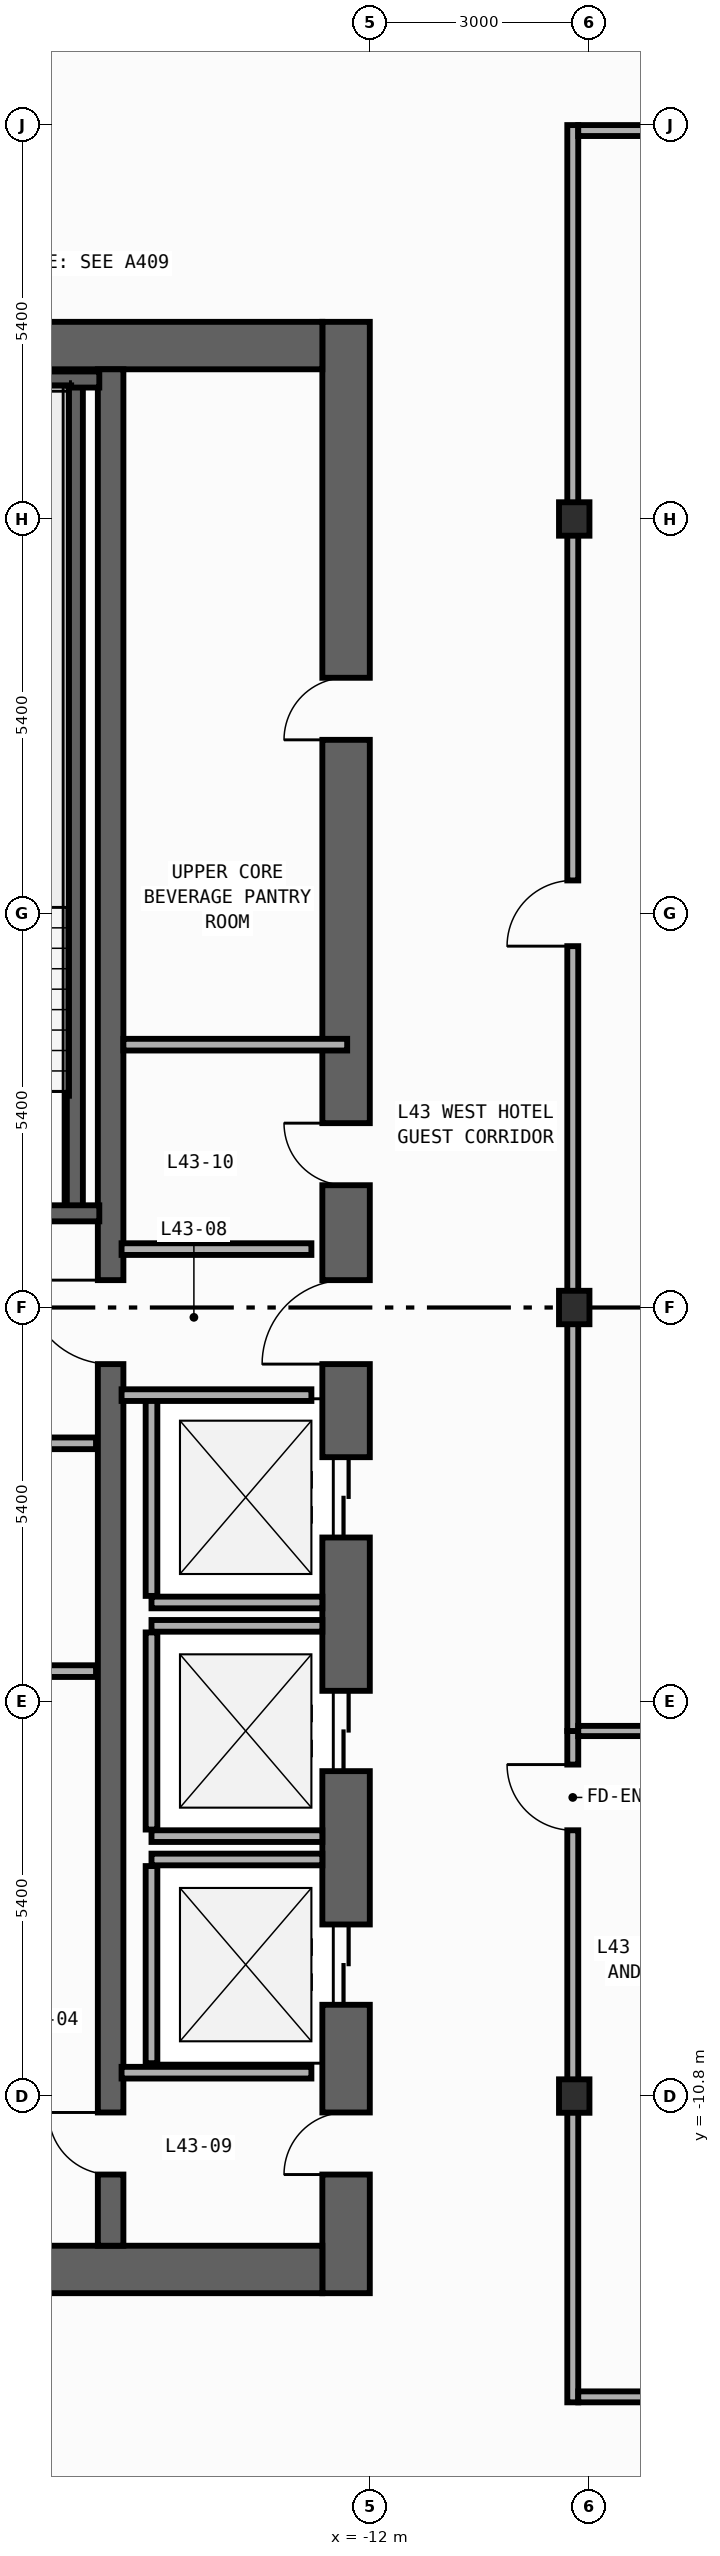
"""IFC4 building model, lengths in metres.
Left out: names, types, materials, properties, quantities, classifications, styles, units other than length and angle.
Written with IfcOpenShell. Run it as: python <this file> out.ifc"""

import sys

from ifc_helpers import new_model, si_unit, direction, frame, frame_2d, origin, origin_2d, place, context, subcontext, project, spatial, rectangle, i_section, extrude, element, fill, save


model = new_model("IFC4")
c1 = context("Model", 3, precision=1e-05, world=origin(), true_north=direction((0.0, 1.0)))
c2 = subcontext(c1, "Body", "Model", "MODEL_VIEW")
j1 = project(units=[si_unit("LENGTHUNIT", "METRE"), si_unit("PLANEANGLEUNIT", "RADIAN")], contexts=[c1])
p1 = place(None, origin())
s1 = spatial("IfcSite", under=j1, at=p1, CompositionType="ELEMENT")
p2 = place(p1, origin())
s2 = spatial("IfcBuilding", under=s1, at=p2, CompositionType="ELEMENT")
p3 = place(p2, frame((0.0, 0.0, 187.8)))
s3 = spatial("IfcBuildingStorey", under=s2, at=p3, CompositionType="ELEMENT", Elevation=187.8)
p4 = place(p3, frame((-12.325, -13.5, 0.0), z_axis=(0.0, 0.0, 1.0), x_axis=(0.0, 1.0, 0.0)))
e1 = element("IfcWall", 1, at=p4, inside=s3, PredefinedType="SHEAR", context=c2, shape_type="SweptSolid", body=[
    extrude(rectangle(XDim=27.0, YDim=0.65, at=frame_2d((13.5, 0.0))), origin(), (0.0, 0.0, 1.0), 3.54),
])
p5 = place(p4, frame((10.35, 0.0, 0.0)))
e2 = element("IfcOpeningElement", 2, at=p5, cuts=e1, PredefinedType="OPENING", context=c2, shape_type="SweptSolid", body=[
    extrude(rectangle(XDim=1.1, YDim=2.2, at=frame_2d((0.55, 1.1))), frame((0.0, 0.335, 0.0), z_axis=(0.0, -1.0, 0.0), x_axis=(1.0, 0.0, 0.0)), (0.0, 0.0, 1.0), 0.67),
])
p6 = place(p4, frame((7.15, 0.0, 0.0)))
e3 = element("IfcOpeningElement", 3, at=p6, cuts=e1, PredefinedType="OPENING", context=c2, shape_type="SweptSolid", body=[
    extrude(rectangle(XDim=1.1, YDim=2.2, at=frame_2d((0.55, 1.1))), frame((0.0, 0.335, 0.0), z_axis=(0.0, -1.0, 0.0), x_axis=(1.0, 0.0, 0.0)), (0.0, 0.0, 1.0), 0.67),
])
p7 = place(p4, frame((3.95, 0.0, 0.0)))
e4 = element("IfcOpeningElement", 4, at=p7, cuts=e1, PredefinedType="OPENING", context=c2, shape_type="SweptSolid", body=[
    extrude(rectangle(XDim=1.1, YDim=2.2, at=frame_2d((0.55, 1.1))), frame((0.0, 0.335, 0.0), z_axis=(0.0, -1.0, 0.0), x_axis=(1.0, 0.0, 0.0)), (0.0, 0.0, 1.0), 0.67),
])
p8 = place(p4, frame((15.175, 0.0, 0.0)))
e5 = element("IfcOpeningElement", 5, at=p8, cuts=e1, PredefinedType="OPENING", context=c2, shape_type="SweptSolid", body=[
    extrude(rectangle(XDim=0.85, YDim=2.1, at=frame_2d((0.425, 1.05))), frame((0.0, 0.335, 0.0), z_axis=(0.0, -1.0, 0.0), x_axis=(1.0, 0.0, 0.0)), (0.0, 0.0, 1.0), 0.67),
])
p9 = place(p4, frame((21.275, 0.0, 0.0)))
e6 = element("IfcOpeningElement", 6, at=p9, cuts=e1, PredefinedType="OPENING", context=c2, shape_type="SweptSolid", body=[
    extrude(rectangle(XDim=0.85, YDim=2.1, at=frame_2d((0.425, 1.05))), frame((0.0, 0.335, 0.0), z_axis=(0.0, -1.0, 0.0), x_axis=(1.0, 0.0, 0.0)), (0.0, 0.0, 1.0), 0.67),
])
p10 = place(p4, frame((12.725, 0.0, 0.0)))
e7 = element("IfcOpeningElement", 7, at=p10, cuts=e1, PredefinedType="OPENING", context=c2, shape_type="SweptSolid", body=[
    extrude(rectangle(XDim=1.15, YDim=2.2, at=frame_2d((0.575, 1.1))), frame((0.0, 0.335, 0.0), z_axis=(0.0, -1.0, 0.0), x_axis=(1.0, 0.0, 0.0)), (0.0, 0.0, 1.0), 0.67),
])
p11 = place(p4, frame((1.625, 0.0, 0.0)))
e8 = element("IfcOpeningElement", 8, at=p11, cuts=e1, PredefinedType="OPENING", context=c2, shape_type="SweptSolid", body=[
    extrude(rectangle(XDim=0.85, YDim=2.1, at=frame_2d((0.425, 1.05))), frame((0.0, 0.335, 0.0), z_axis=(0.0, -1.0, 0.0), x_axis=(1.0, 0.0, 0.0)), (0.0, 0.0, 1.0), 0.67),
])
for number, where, z_axis, x_axis in (
    (9, (-19.75, -13.175, 0.0), (0.0, 0.0, 1.0), (1.0, 0.0, 0.0)),
    (10, (-19.75, 13.175, 0.0), (0.0, 0.0, 1.0), (1.0, 0.0, 0.0)),
):
    element("IfcWall", number, at=place(p3, frame(where, z_axis=z_axis, x_axis=x_axis)), inside=s3, PredefinedType="SHEAR", context=c2, shape_type="SweptSolid", body=[
        extrude(rectangle(XDim=7.1, YDim=0.65, at=frame_2d((3.55, 0.0))), origin(), (0.0, 0.0, 1.0), 3.54),
    ])
p12 = place(p3, frame((-15.55, -12.85, 0.0), z_axis=(0.0, 0.0, 1.0), x_axis=(0.0, 1.0, 0.0)))
e11 = element("IfcWall", 11, at=p12, inside=s3, PredefinedType="SHEAR", context=c2, shape_type="SweptSolid", body=[
    extrude(rectangle(XDim=25.7, YDim=0.35, at=frame_2d((12.85, 0.0))), origin(), (0.0, 0.0, 1.0), 3.54),
])
p13 = place(p12, frame((12.075, 0.0, 0.0)))
e12 = element("IfcOpeningElement", 12, at=p13, cuts=e11, PredefinedType="OPENING", context=c2, shape_type="SweptSolid", body=[
    extrude(rectangle(XDim=1.15, YDim=2.2, at=frame_2d((0.575, 1.1))), frame((0.0, 0.185, 0.0), z_axis=(0.0, -1.0, 0.0), x_axis=(1.0, 0.0, 0.0)), (0.0, 0.0, 1.0), 0.37),
])
p14 = place(p12, frame((0.975, 0.0, 0.0)))
e13 = element("IfcOpeningElement", 13, at=p14, cuts=e11, PredefinedType="OPENING", context=c2, shape_type="SweptSolid", body=[
    extrude(rectangle(XDim=0.85, YDim=2.1, at=frame_2d((0.425, 1.05))), frame((0.0, 0.185, 0.0), z_axis=(0.0, -1.0, 0.0), x_axis=(1.0, 0.0, 0.0)), (0.0, 0.0, 1.0), 0.37),
])
p15 = place(p3, frame((-16.04, 1.29, 0.0), z_axis=(0.0, 0.0, 1.0), x_axis=(0.0, 1.0, 0.0)))
e14 = element("IfcWall", 14, at=p15, inside=s3, PredefinedType="SHEAR", context=c2, shape_type="SweptSolid", body=[
    extrude(rectangle(XDim=11.42, YDim=0.22, at=frame_2d((5.71, 0.0))), origin(), (0.0, 0.0, 1.0), 3.54),
])
p16 = place(p3, frame((-19.77, 12.71, 0.0), z_axis=(0.0, 0.0, 1.0), x_axis=(1.0, 0.0, 0.0)))
e15 = element("IfcWall", 15, at=p16, inside=s3, PredefinedType="SHEAR", context=c2, shape_type="SweptSolid", body=[
    extrude(rectangle(XDim=4.065, YDim=0.22, at=frame_2d((2.032, 0.0))), origin(), (0.0, 0.0, 1.0), 3.54),
])
p17 = place(p3, frame((-19.77, 1.29, 0.0), z_axis=(0.0, 0.0, 1.0), x_axis=(1.0, 0.0, 0.0)))
e16 = element("IfcWall", 16, at=p17, inside=s3, PredefinedType="SHEAR", context=c2, shape_type="SweptSolid", body=[
    extrude(rectangle(XDim=4.065, YDim=0.22, at=frame_2d((2.032, 0.0))), origin(), (0.0, 0.0, 1.0), 3.54),
])
p18 = place(p17, frame((1.08, 0.0, 0.0)))
e17 = element("IfcOpeningElement", 17, at=p18, cuts=e16, PredefinedType="OPENING", context=c2, shape_type="SweptSolid", body=[
    extrude(rectangle(XDim=1.1, YDim=2.2, at=frame_2d((0.55, 1.1))), frame((0.0, 0.12, 0.0), z_axis=(0.0, -1.0, 0.0), x_axis=(1.0, 0.0, 0.0)), (0.0, 0.0, 1.0), 0.24),
])
for number, where, z_axis, x_axis in (
    (18, (-9.2, -10.8, 0.0), (0.0, 0.0, 1.0), (1.0, 0.0, 0.0)),
    (19, (-9.2, 0.0, 0.0), (0.0, 0.0, 1.0), (1.0, 0.0, 0.0)),
    (20, (-9.2, 10.8, 0.0), (0.0, 0.0, 1.0), (1.0, 0.0, 0.0)),
):
    element("IfcColumn", number, at=place(p3, frame(where, z_axis=z_axis, x_axis=x_axis)), inside=s3, PredefinedType="COLUMN", context=c2, shape_type="SweptSolid", body=[
        extrude(i_section(OverallWidth=0.417, OverallDepth=0.458, WebThickness=0.03, FlangeThickness=0.05, FilletRadius=0.022, at=origin_2d()), origin(), (0.0, 0.0, 1.0), 3.8),
    ])
p19 = place(p3, frame((-14.99, -4.04, 0.0), z_axis=(0.0, 0.0, 1.0), x_axis=(1.0, 0.0, 0.0)))
e21 = element("IfcWall", 21, at=p19, inside=s3, PredefinedType="STANDARD", context=c2, shape_type="SweptSolid", body=[
    extrude(rectangle(XDim=2.34, YDim=0.16, at=frame_2d((1.17, 0.0))), origin(), (0.0, 0.0, 1.0), 3.54),
])
p20 = place(p3, frame((-14.99, -3.95, 0.0), z_axis=(0.0, 0.0, 1.0), x_axis=(0.0, 1.0, 0.0)))
e22 = element("IfcWall", 22, at=p20, inside=s3, PredefinedType="STANDARD", context=c2, shape_type="SweptSolid", body=[
    extrude(rectangle(XDim=2.7, YDim=0.16, at=frame_2d((1.35, 0.0))), origin(), (0.0, 0.0, 1.0), 3.54),
])
for number, where, z_axis, x_axis in (
    (23, (-14.99, -7.24, 0.0), (0.0, 0.0, 1.0), (1.0, 0.0, 0.0)),
    (24, (-14.99, -4.36, 0.0), (0.0, 0.0, 1.0), (1.0, 0.0, 0.0)),
):
    element("IfcWall", number, at=place(p3, frame(where, z_axis=z_axis, x_axis=x_axis)), inside=s3, PredefinedType="STANDARD", context=c2, shape_type="SweptSolid", body=[
        extrude(rectangle(XDim=2.34, YDim=0.16, at=frame_2d((1.17, 0.0))), origin(), (0.0, 0.0, 1.0), 3.54),
    ])
p21 = place(p3, frame((-14.99, -7.15, 0.0), z_axis=(0.0, 0.0, 1.0), x_axis=(0.0, 1.0, 0.0)))
e25 = element("IfcWall", 25, at=p21, inside=s3, PredefinedType="STANDARD", context=c2, shape_type="SweptSolid", body=[
    extrude(rectangle(XDim=2.7, YDim=0.16, at=frame_2d((1.35, 0.0))), origin(), (0.0, 0.0, 1.0), 3.54),
])
p22 = place(p3, frame((-14.99, -7.56, 0.0), z_axis=(0.0, 0.0, 1.0), x_axis=(1.0, 0.0, 0.0)))
e26 = element("IfcWall", 26, at=p22, inside=s3, PredefinedType="STANDARD", context=c2, shape_type="SweptSolid", body=[
    extrude(rectangle(XDim=2.34, YDim=0.16, at=frame_2d((1.17, 0.0))), origin(), (0.0, 0.0, 1.0), 3.54),
])
p23 = place(p3, frame((-14.99, -10.35, 0.0), z_axis=(0.0, 0.0, 1.0), x_axis=(0.0, 1.0, 0.0)))
e27 = element("IfcWall", 27, at=p23, inside=s3, PredefinedType="STANDARD", context=c2, shape_type="SweptSolid", body=[
    extrude(rectangle(XDim=2.7, YDim=0.16, at=frame_2d((1.35, 0.0))), origin(), (0.0, 0.0, 1.0), 3.54),
])
p24 = place(p3, frame((-19.55, -1.86, 0.0), z_axis=(0.0, 0.0, 1.0), x_axis=(1.0, 0.0, 0.0)))
e28 = element("IfcWall", 28, at=p24, inside=s3, PredefinedType="STANDARD", context=c2, shape_type="SweptSolid", body=[
    extrude(rectangle(XDim=3.8, YDim=0.16, at=frame_2d((1.9, 0.0))), origin(), (0.0, 0.0, 1.0), 3.54),
])
p25 = place(p24, frame((1.18, 0.0, 0.0)))
e29 = element("IfcOpeningElement", 29, at=p25, cuts=e28, PredefinedType="OPENING", context=c2, shape_type="SweptSolid", body=[
    extrude(rectangle(XDim=1.15, YDim=2.2, at=frame_2d((0.575, 1.1))), frame((0.0, 0.09, 0.0), z_axis=(0.0, -1.0, 0.0), x_axis=(1.0, 0.0, 0.0)), (0.0, 0.0, 1.0), 0.18),
])
p26 = place(p3, frame((-19.55, -4.98, 0.0), z_axis=(0.0, 0.0, 1.0), x_axis=(1.0, 0.0, 0.0)))
e30 = element("IfcWall", 30, at=p26, inside=s3, PredefinedType="STANDARD", context=c2, shape_type="SweptSolid", body=[
    extrude(rectangle(XDim=3.8, YDim=0.16, at=frame_2d((1.9, 0.0))), origin(), (0.0, 0.0, 1.0), 3.54),
])
for number, where, z_axis, x_axis in (
    (31, (-15.4, 0.8, 0.0), (0.0, 0.0, 1.0), (1.0, 0.0, 0.0)),
    (32, (-15.4, -1.2, 0.0), (0.0, 0.0, 1.0), (1.0, 0.0, 0.0)),
    (33, (-15.4, -10.48, 0.0), (0.0, 0.0, 1.0), (1.0, 0.0, 0.0)),
):
    element("IfcWall", number, at=place(p3, frame(where, z_axis=z_axis, x_axis=x_axis)), inside=s3, PredefinedType="STANDARD", context=c2, shape_type="SweptSolid", body=[
        extrude(rectangle(XDim=2.6, YDim=0.16, at=frame_2d((1.3, 0.0))), origin(), (0.0, 0.0, 1.0), 3.54),
    ])
p27 = place(p3, frame((-15.375, 3.6, 0.0), z_axis=(0.0, 0.0, 1.0), x_axis=(1.0, 0.0, 0.0)))
e34 = element("IfcWall", 34, at=p27, inside=s3, PredefinedType="PARTITIONING", context=c2, shape_type="SweptSolid", body=[
    extrude(rectangle(XDim=3.065, YDim=0.16, at=frame_2d((1.532, 0.0))), origin(), (0.0, 0.0, 1.0), 3.54),
])
p28 = place(p3, frame((-9.22, -14.995, 0.0), z_axis=(0.0, 0.0, 1.0), x_axis=(0.0, 1.0, 0.0)))
e35 = element("IfcWall", 35, at=p28, inside=s3, PredefinedType="PARTITIONING", context=c2, shape_type="SweptSolid", body=[
    extrude(rectangle(XDim=9.195, YDim=0.15, at=frame_2d((4.598, 0.0))), origin(), (0.0, 0.0, 1.0), 2.952),
])
p29 = place(p28, frame((7.835, 0.0, 0.0)))
e36 = element("IfcOpeningElement", 36, at=p29, cuts=e35, PredefinedType="OPENING", context=c2, shape_type="SweptSolid", body=[
    extrude(rectangle(XDim=0.9, YDim=2.15, at=frame_2d((0.45, 1.075))), frame((0.0, 0.085, 0.0), z_axis=(0.0, -1.0, 0.0), x_axis=(1.0, 0.0, 0.0)), (0.0, 0.0, 1.0), 0.17),
])
p30 = place(p3, frame((-9.22, -5.8, 0.0), z_axis=(0.0, 0.0, 1.0), x_axis=(0.0, 1.0, 0.0)))
e37 = element("IfcWall", 37, at=p30, inside=s3, PredefinedType="PARTITIONING", context=c2, shape_type="SweptSolid", body=[
    extrude(rectangle(XDim=21.995, YDim=0.15, at=frame_2d((10.998, 0.0))), origin(), (0.0, 0.0, 1.0), 2.952),
])
p31 = place(p30, frame((10.749, 0.0, 0.0)))
e38 = element("IfcOpeningElement", 38, at=p31, cuts=e37, PredefinedType="OPENING", context=c2, shape_type="SweptSolid", body=[
    extrude(rectangle(XDim=0.9, YDim=2.15, at=frame_2d((0.45, 1.075))), frame((0.0, 0.085, 0.0), z_axis=(0.0, -1.0, 0.0), x_axis=(1.0, 0.0, 0.0)), (0.0, 0.0, 1.0), 0.17),
])
p32 = place(p3, frame((-9.145, 16.12, 0.0), z_axis=(0.0, 0.0, 1.0), x_axis=(1.0, 0.0, 0.0)))
e39 = element("IfcWall", 39, at=p32, inside=s3, PredefinedType="PARTITIONING", context=c2, shape_type="SweptSolid", body=[
    extrude(rectangle(XDim=6.225, YDim=0.15, at=frame_2d((3.113, 0.0))), origin(), (0.0, 0.0, 1.0), 3.54),
])
p33 = place(p32, frame((1.661, 0.0, 0.0)))
e40 = element("IfcOpeningElement", 40, at=p33, cuts=e39, PredefinedType="OPENING", context=c2, shape_type="SweptSolid", body=[
    extrude(rectangle(XDim=0.9, YDim=2.15, at=frame_2d((0.45, 1.075))), frame((0.0, 0.085, 0.0), z_axis=(0.0, -1.0, 0.0), x_axis=(1.0, 0.0, 0.0)), (0.0, 0.0, 1.0), 0.17),
])
p34 = place(p3, frame((-9.145, -14.92, 0.0), z_axis=(0.0, 0.0, 1.0), x_axis=(1.0, 0.0, 0.0)))
e41 = element("IfcWall", 41, at=p34, inside=s3, PredefinedType="PARTITIONING", context=c2, shape_type="SweptSolid", body=[
    extrude(rectangle(XDim=3.025, YDim=0.15, at=frame_2d((1.512, 0.0))), origin(), (0.0, 0.0, 1.0), 3.54),
])
p35 = place(p34, frame((1.665, 0.0, 0.0)))
e42 = element("IfcOpeningElement", 42, at=p35, cuts=e41, PredefinedType="OPENING", context=c2, shape_type="SweptSolid", body=[
    extrude(rectangle(XDim=0.9, YDim=2.15, at=frame_2d((0.45, 1.075))), frame((0.0, 0.085, 0.0), z_axis=(0.0, -1.0, 0.0), x_axis=(1.0, 0.0, 0.0)), (0.0, 0.0, 1.0), 0.17),
])
p36 = place(p3, frame((-9.145, -5.8, 0.0), z_axis=(0.0, 0.0, 1.0), x_axis=(1.0, 0.0, 0.0)))
e43 = element("IfcWall", 43, at=p36, inside=s3, PredefinedType="PARTITIONING", context=c2, shape_type="SweptSolid", body=[
    extrude(rectangle(XDim=3.025, YDim=0.14, at=frame_2d((1.512, 0.0))), origin(), (0.0, 0.0, 1.0), 3.54),
])
p37 = place(p5, origin())
e44 = element("IfcDoor", 44, at=p37, inside=s3, OperationType="DOUBLE_DOOR_SLIDING", PredefinedType="DOOR", context=c2, shape_type="SweptSolid", body=[
    extrude(rectangle(XDim=1.1, YDim=2.2, at=frame_2d((0.55, 1.1))), frame((0.0, 0.025, 0.0), z_axis=(0.0, -1.0, 0.0), x_axis=(1.0, 0.0, 0.0)), (0.0, 0.0, 1.0), 0.05),
])
fill(e2, e44)
p38 = place(p6, origin())
e45 = element("IfcDoor", 45, at=p38, inside=s3, OperationType="DOUBLE_DOOR_SLIDING", PredefinedType="DOOR", context=c2, shape_type="SweptSolid", body=[
    extrude(rectangle(XDim=1.1, YDim=2.2, at=frame_2d((0.55, 1.1))), frame((0.0, 0.025, 0.0), z_axis=(0.0, -1.0, 0.0), x_axis=(1.0, 0.0, 0.0)), (0.0, 0.0, 1.0), 0.05),
])
fill(e3, e45)
p39 = place(p7, origin())
e46 = element("IfcDoor", 46, at=p39, inside=s3, OperationType="DOUBLE_DOOR_SLIDING", PredefinedType="DOOR", context=c2, shape_type="SweptSolid", body=[
    extrude(rectangle(XDim=1.1, YDim=2.2, at=frame_2d((0.55, 1.1))), frame((0.0, 0.025, 0.0), z_axis=(0.0, -1.0, 0.0), x_axis=(1.0, 0.0, 0.0)), (0.0, 0.0, 1.0), 0.05),
])
fill(e4, e46)
p40 = place(p8, origin())
e47 = element("IfcDoor", 47, at=p40, inside=s3, OperationType="SINGLE_SWING_RIGHT", PredefinedType="DOOR", context=c2, shape_type="SweptSolid", body=[
    extrude(rectangle(XDim=0.85, YDim=2.1, at=frame_2d((0.425, 1.05))), frame((0.0, 0.025, 0.0), z_axis=(0.0, -1.0, 0.0), x_axis=(1.0, 0.0, 0.0)), (0.0, 0.0, 1.0), 0.05),
])
fill(e5, e47)
p41 = place(p9, origin())
e48 = element("IfcDoor", 48, at=p41, inside=s3, OperationType="SINGLE_SWING_LEFT", PredefinedType="DOOR", context=c2, shape_type="SweptSolid", body=[
    extrude(rectangle(XDim=0.85, YDim=2.1, at=frame_2d((0.425, 1.05))), frame((0.0, 0.025, 0.0), z_axis=(0.0, -1.0, 0.0), x_axis=(1.0, 0.0, 0.0)), (0.0, 0.0, 1.0), 0.05),
])
fill(e6, e48)
p42 = place(p10, origin())
e49 = element("IfcDoor", 49, at=p42, inside=s3, OperationType="SINGLE_SWING_LEFT", PredefinedType="DOOR", context=c2, shape_type="SweptSolid", body=[
    extrude(rectangle(XDim=1.15, YDim=2.2, at=frame_2d((0.575, 1.1))), frame((0.0, 0.025, 0.0), z_axis=(0.0, -1.0, 0.0), x_axis=(1.0, 0.0, 0.0)), (0.0, 0.0, 1.0), 0.05),
])
fill(e7, e49)
p43 = place(p13, origin())
e50 = element("IfcDoor", 50, at=p43, inside=s3, OperationType="SINGLE_SWING_RIGHT", PredefinedType="DOOR", context=c2, shape_type="SweptSolid", body=[
    extrude(rectangle(XDim=1.15, YDim=2.2, at=frame_2d((0.575, 1.1))), frame((0.0, 0.025, 0.0), z_axis=(0.0, -1.0, 0.0), x_axis=(1.0, 0.0, 0.0)), (0.0, 0.0, 1.0), 0.05),
])
fill(e12, e50)
p44 = place(p11, origin())
e51 = element("IfcDoor", 51, at=p44, inside=s3, OperationType="SINGLE_SWING_LEFT", PredefinedType="DOOR", context=c2, shape_type="SweptSolid", body=[
    extrude(rectangle(XDim=0.85, YDim=2.1, at=frame_2d((0.425, 1.05))), frame((0.0, 0.025, 0.0), z_axis=(0.0, -1.0, 0.0), x_axis=(1.0, 0.0, 0.0)), (0.0, 0.0, 1.0), 0.05),
])
fill(e8, e51)
p45 = place(p14, origin())
e52 = element("IfcDoor", 52, at=p45, inside=s3, OperationType="SINGLE_SWING_RIGHT", PredefinedType="DOOR", context=c2, shape_type="SweptSolid", body=[
    extrude(rectangle(XDim=0.85, YDim=2.1, at=frame_2d((0.425, 1.05))), frame((0.0, 0.025, 0.0), z_axis=(0.0, -1.0, 0.0), x_axis=(1.0, 0.0, 0.0)), (0.0, 0.0, 1.0), 0.05),
])
fill(e13, e52)
p46 = place(p29, origin())
e53 = element("IfcDoor", 53, at=p46, inside=s3, OperationType="SINGLE_SWING_RIGHT", PredefinedType="DOOR", context=c2, shape_type="SweptSolid", body=[
    extrude(rectangle(XDim=0.9, YDim=2.15, at=frame_2d((0.45, 1.075))), frame((0.0, 0.025, 0.0), z_axis=(0.0, -1.0, 0.0), x_axis=(1.0, 0.0, 0.0)), (0.0, 0.0, 1.0), 0.05),
])
fill(e36, e53)
p47 = place(p31, origin())
e54 = element("IfcDoor", 54, at=p47, inside=s3, OperationType="SINGLE_SWING_LEFT", PredefinedType="DOOR", context=c2, shape_type="SweptSolid", body=[
    extrude(rectangle(XDim=0.9, YDim=2.15, at=frame_2d((0.45, 1.075))), frame((0.0, 0.025, 0.0), z_axis=(0.0, -1.0, 0.0), x_axis=(1.0, 0.0, 0.0)), (0.0, 0.0, 1.0), 0.05),
])
fill(e38, e54)
save(model, sys.argv[1])
